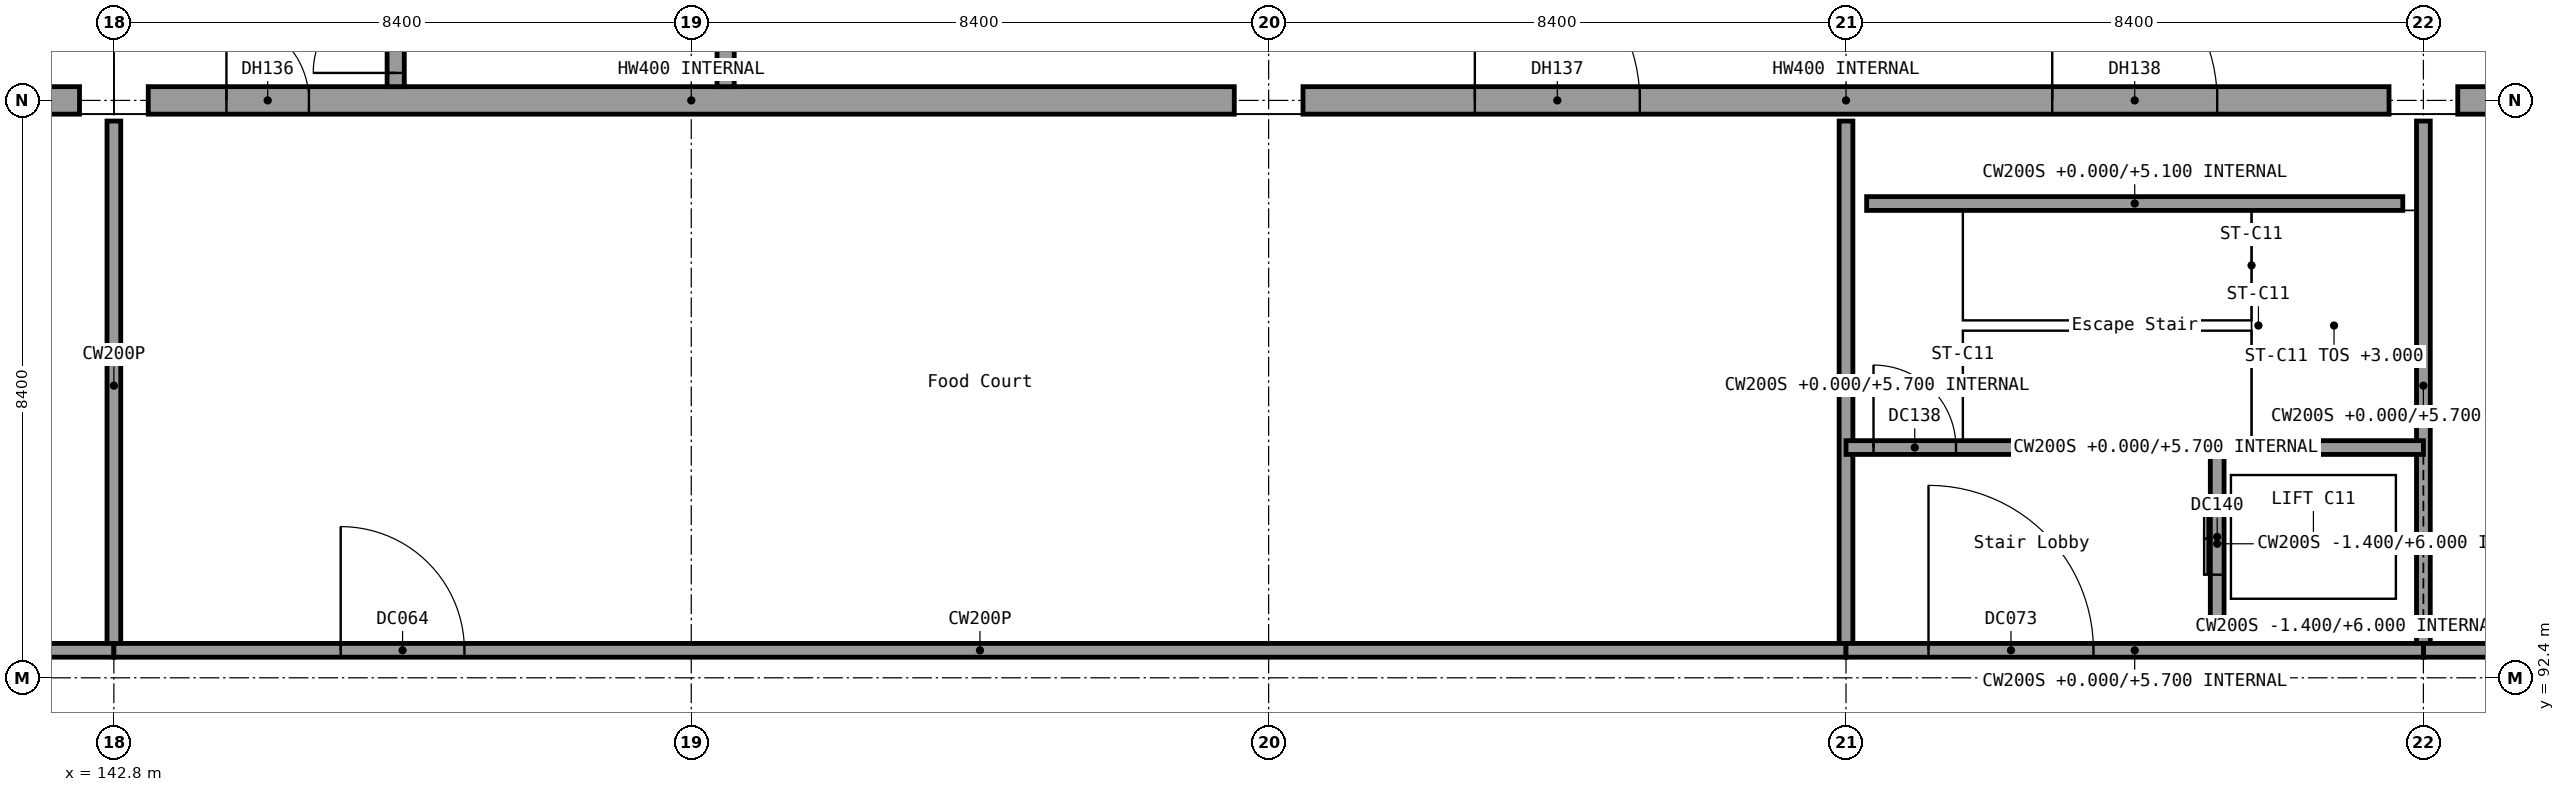
"""IFC4 building model, lengths in metres.
Left out: names, types, materials, properties, quantities, classifications, styles, units other than length and angle.
Written with IfcOpenShell. Run it as: python <this file> out.ifc"""

import sys

from ifc_helpers import new_model, si_unit, direction, frame, frame_2d, origin, origin_2d, place, context, subcontext, project, spatial, rectangle, extrude, element, fill, save


model = new_model("IFC4")
c1 = context("Model", 3, precision=1e-05, world=origin(), true_north=direction((0.0, 1.0)))
c2 = subcontext(c1, "Body", "Model", "MODEL_VIEW")
j1 = project(units=[si_unit("LENGTHUNIT", "METRE"), si_unit("PLANEANGLEUNIT", "RADIAN")], contexts=[c1])
p1 = place(None, origin())
s1 = spatial("IfcSite", under=j1, at=p1, CompositionType="ELEMENT")
p2 = place(p1, origin())
s2 = spatial("IfcBuilding", under=s1, at=p2, CompositionType="ELEMENT")
p3 = place(p2, origin())
s3 = spatial("IfcBuildingStorey", under=s2, at=p3, CompositionType="ELEMENT", Elevation=0.0)
for number, where, z_axis, x_axis in (
    (1, (142.8, 100.8, 0.0), (0.0, 0.0, 1.0), (1.0, 0.0, 0.0)),
    (2, (159.6, 100.8, 0.0), (0.0, 0.0, 1.0), (1.0, 0.0, 0.0)),
    (3, (176.4, 100.8, 0.0), (0.0, 0.0, 1.0), (1.0, 0.0, 0.0)),
):
    element("IfcColumn", number, at=place(p3, frame(where, z_axis=z_axis, x_axis=x_axis)), inside=s3, PredefinedType="COLUMN", context=c2, shape_type="SweptSolid", body=[
        extrude(rectangle(XDim=1.0, YDim=1.6, at=origin_2d()), origin(), (0.0, 0.0, 1.0), 6.0),
    ])
p4 = place(p3, frame((143.3, 100.8, 0.0), z_axis=(0.0, 0.0, 1.0), x_axis=(1.0, 0.0, 0.0)))
e4 = element("IfcWall", 4, at=p4, inside=s3, PredefinedType="STANDARD", context=c2, shape_type="SweptSolid", body=[
    extrude(rectangle(XDim=15.8, YDim=0.4, at=frame_2d((7.9, 0.0))), origin(), (0.0, 0.0, 1.0), 4.5),
])
p5 = place(p4, frame((1.137, 0.0, 0.0)))
e5 = element("IfcOpeningElement", 5, at=p5, cuts=e4, PredefinedType="OPENING", context=c2, shape_type="SweptSolid", body=[
    extrude(rectangle(XDim=1.2, YDim=2.1, at=frame_2d((0.6, 1.05))), frame((0.0, 0.2, 0.0), z_axis=(0.0, -1.0, 0.0), x_axis=(1.0, 0.0, 0.0)), (0.0, 0.0, 1.0), 0.4),
])
p6 = place(p3, frame((160.1, 100.8, 0.0), z_axis=(0.0, 0.0, 1.0), x_axis=(1.0, 0.0, 0.0)))
e6 = element("IfcWall", 6, at=p6, inside=s3, PredefinedType="STANDARD", context=c2, shape_type="SweptSolid", body=[
    extrude(rectangle(XDim=15.8, YDim=0.4, at=frame_2d((7.9, 0.0))), origin(), (0.0, 0.0, 1.0), 4.5),
])
p7 = place(p6, frame((2.5, 0.0, 0.0)))
e7 = element("IfcOpeningElement", 7, at=p7, cuts=e6, PredefinedType="OPENING", context=c2, shape_type="SweptSolid", body=[
    extrude(rectangle(XDim=2.4, YDim=2.4, at=frame_2d((1.2, 1.2))), frame((0.0, 0.2, 0.0), z_axis=(0.0, -1.0, 0.0), x_axis=(1.0, 0.0, 0.0)), (0.0, 0.0, 1.0), 0.4),
])
p8 = place(p6, frame((10.9, 0.0, 0.0)))
e8 = element("IfcOpeningElement", 8, at=p8, cuts=e6, PredefinedType="OPENING", context=c2, shape_type="SweptSolid", body=[
    extrude(rectangle(XDim=2.4, YDim=2.4, at=frame_2d((1.2, 1.2))), frame((0.0, 0.2, 0.0), z_axis=(0.0, -1.0, 0.0), x_axis=(1.0, 0.0, 0.0)), (0.0, 0.0, 1.0), 0.4),
])
p9 = place(p3, frame((176.9, 100.8, 0.0), z_axis=(0.0, 0.0, 1.0), x_axis=(1.0, 0.0, 0.0)))
e9 = element("IfcWall", 9, at=p9, inside=s3, PredefinedType="STANDARD", context=c2, shape_type="SweptSolid", body=[
    extrude(rectangle(XDim=15.8, YDim=0.4, at=frame_2d((7.9, 0.0))), origin(), (0.0, 0.0, 1.0), 4.5),
])
p10 = place(p9, frame((2.5, 0.0, 0.0)))
e10 = element("IfcOpeningElement", 10, at=p10, cuts=e9, PredefinedType="OPENING", context=c2, shape_type="SweptSolid", body=[
    extrude(rectangle(XDim=2.4, YDim=2.4, at=frame_2d((1.2, 1.2))), frame((0.0, 0.2, 0.0), z_axis=(0.0, -1.0, 0.0), x_axis=(1.0, 0.0, 0.0)), (0.0, 0.0, 1.0), 0.4),
])
p11 = place(p9, frame((10.9, 0.0, 0.0)))
e11 = element("IfcOpeningElement", 11, at=p11, cuts=e9, PredefinedType="OPENING", context=c2, shape_type="SweptSolid", body=[
    extrude(rectangle(XDim=2.4, YDim=2.4, at=frame_2d((1.2, 1.2))), frame((0.0, 0.2, 0.0), z_axis=(0.0, -1.0, 0.0), x_axis=(1.0, 0.0, 0.0)), (0.0, 0.0, 1.0), 0.4),
])
p12 = place(p3, frame((126.5, 100.8, 0.0), z_axis=(0.0, 0.0, 1.0), x_axis=(1.0, 0.0, 0.0)))
e12 = element("IfcWall", 12, at=p12, inside=s3, PredefinedType="SHEAR", context=c2, shape_type="SweptSolid", body=[
    extrude(rectangle(XDim=15.8, YDim=0.4, at=frame_2d((7.9, 0.0))), origin(), (0.0, 0.0, 1.0), 5.7),
])
p13 = place(p12, frame((2.5, 0.0, 0.0)))
e13 = element("IfcOpeningElement", 13, at=p13, cuts=e12, PredefinedType="OPENING", context=c2, shape_type="SweptSolid", body=[
    extrude(rectangle(XDim=2.4, YDim=2.4, at=frame_2d((1.2, 1.2))), frame((0.0, 0.2, 0.0), z_axis=(0.0, -1.0, 0.0), x_axis=(1.0, 0.0, 0.0)), (0.0, 0.0, 1.0), 0.4),
])
p14 = place(p12, frame((10.9, 0.0, 0.0)))
e14 = element("IfcOpeningElement", 14, at=p14, cuts=e12, PredefinedType="OPENING", context=c2, shape_type="SweptSolid", body=[
    extrude(rectangle(XDim=2.4, YDim=2.4, at=frame_2d((1.2, 1.2))), frame((0.0, 0.2, 0.0), z_axis=(0.0, -1.0, 0.0), x_axis=(1.0, 0.0, 0.0)), (0.0, 0.0, 1.0), 0.4),
])
p15 = place(p3, frame((146.9, 101.0, 0.0), z_axis=(0.0, 0.0, 1.0), x_axis=(0.0, 1.0, 0.0)))
e15 = element("IfcWall", 15, at=p15, inside=s3, PredefinedType="SHEAR", context=c2, shape_type="SweptSolid", body=[
    extrude(rectangle(XDim=8.2, YDim=0.25, at=frame_2d((4.1, 0.0))), origin(), (0.0, 0.0, 1.0), 5.7),
])
p16 = place(p15, frame((0.2, 0.0, 0.0)))
e16 = element("IfcOpeningElement", 16, at=p16, cuts=e15, PredefinedType="OPENING", context=c2, shape_type="SweptSolid", body=[
    extrude(rectangle(XDim=1.2, YDim=2.1, at=frame_2d((0.6, 1.05))), frame((0.0, 0.125, 0.0), z_axis=(0.0, -1.0, 0.0), x_axis=(1.0, 0.0, 0.0)), (0.0, 0.0, 1.0), 0.25),
])
p17 = place(p3, frame((151.7, 101.0, 0.0), z_axis=(0.0, 0.0, 1.0), x_axis=(0.0, 1.0, 0.0)))
e17 = element("IfcWall", 17, at=p17, inside=s3, PredefinedType="SHEAR", context=c2, shape_type="SweptSolid", body=[
    extrude(rectangle(XDim=8.2, YDim=0.25, at=frame_2d((4.1, 0.0))), origin(), (0.0, 0.0, 1.0), 5.7),
])
p18 = place(p17, frame((2.0, 0.0, 0.0)))
e18 = element("IfcOpeningElement", 18, at=p18, cuts=e17, PredefinedType="OPENING", context=c2, shape_type="SweptSolid", body=[
    extrude(rectangle(XDim=1.2, YDim=2.1, at=frame_2d((0.6, 1.05))), frame((0.0, 0.125, 0.0), z_axis=(0.0, -1.0, 0.0), x_axis=(1.0, 0.0, 0.0)), (0.0, 0.0, 1.0), 0.25),
])
for number, where, z_axis, x_axis in (
    (19, (142.8, 92.4, 0.0), (0.0, 0.0, 1.0), (1.0, 0.0, 0.0)),
    (20, (151.2, 92.4, 0.0), (0.0, 0.0, 1.0), (1.0, 0.0, 0.0)),
    (21, (159.6, 92.4, 0.0), (0.0, 0.0, 1.0), (1.0, 0.0, 0.0)),
    (22, (168.0, 92.4, 0.0), (0.0, 0.0, 1.0), (1.0, 0.0, 0.0)),
    (23, (176.4, 92.4, 0.0), (0.0, 0.0, 1.0), (1.0, 0.0, 0.0)),
    (24, (142.8, 99.6, 0.0), (0.0, 0.0, 1.0), (1.0, 0.0, 0.0)),
    (25, (151.2, 99.6, 0.0), (0.0, 0.0, 1.0), (1.0, 0.0, 0.0)),
    (26, (159.6, 99.6, 0.0), (0.0, 0.0, 1.0), (1.0, 0.0, 0.0)),
    (27, (168.0, 99.6, 0.0), (0.0, 0.0, 1.0), (1.0, 0.0, 0.0)),
    (28, (176.4, 99.6, 0.0), (0.0, 0.0, 1.0), (1.0, 0.0, 0.0)),
):
    element("IfcColumn", number, at=place(p3, frame(where, z_axis=z_axis, x_axis=x_axis)), inside=s3, PredefinedType="COLUMN", context=c2, shape_type="SweptSolid", body=[
        extrude(rectangle(XDim=0.6, YDim=0.6, at=origin_2d()), origin(), (0.0, 0.0, 1.0), 6.0),
    ])
for number, where, z_axis, x_axis in (
    (29, (168.0, 100.5, 0.0), (0.0, 0.0, 1.0), (0.0, -1.0, 0.0)),
    (30, (176.4, 100.5, 0.0), (0.0, 0.0, 1.0), (0.0, -1.0, 0.0)),
):
    element("IfcWall", number, at=place(p3, frame(where, z_axis=z_axis, x_axis=x_axis)), inside=s3, PredefinedType="SOLIDWALL", context=c2, shape_type="SweptSolid", body=[
        extrude(rectangle(XDim=7.7, YDim=0.2, at=frame_2d((3.85, 0.0))), origin(), (0.0, 0.0, 1.0), 5.7),
    ])
p19 = place(p3, frame((168.3, 99.3, 0.0), z_axis=(0.0, 0.0, 1.0), x_axis=(1.0, 0.0, 0.0)))
e31 = element("IfcWall", 31, at=p19, inside=s3, PredefinedType="SOLIDWALL", context=c2, shape_type="SweptSolid", body=[
    extrude(rectangle(XDim=7.8, YDim=0.2, at=frame_2d((3.9, 0.0))), origin(), (0.0, 0.0, 1.0), 5.1),
])
p20 = place(p3, frame((142.8, 100.5, 0.0), z_axis=(0.0, 0.0, 1.0), x_axis=(0.0, -1.0, 0.0)))
e32 = element("IfcWall", 32, at=p20, inside=s3, PredefinedType="PARTITIONING", context=c2, shape_type="SweptSolid", body=[
    extrude(rectangle(XDim=7.7, YDim=0.2, at=frame_2d((3.85, 0.0))), origin(), (0.0, 0.0, 1.0), 5.7),
])
p21 = place(p3, frame((126.0, 92.8, 0.0), z_axis=(0.0, 0.0, 1.0), x_axis=(1.0, 0.0, 0.0)))
e33 = element("IfcWall", 33, at=p21, inside=s3, PredefinedType="PARTITIONING", context=c2, shape_type="SweptSolid", body=[
    extrude(rectangle(XDim=16.8, YDim=0.2, at=frame_2d((8.4, 0.0))), origin(), (0.0, 0.0, 1.0), 5.7),
])
p22 = place(p21, frame((3.3, 0.0, 0.0)))
e34 = element("IfcOpeningElement", 34, at=p22, cuts=e33, PredefinedType="OPENING", context=c2, shape_type="SweptSolid", body=[
    extrude(rectangle(XDim=1.8, YDim=2.4, at=frame_2d((0.9, 1.2))), frame((0.0, 0.1, 0.0), z_axis=(0.0, -1.0, 0.0), x_axis=(1.0, 0.0, 0.0)), (0.0, 0.0, 1.0), 0.2),
])
p23 = place(p3, frame((142.8, 92.8, 0.0), z_axis=(0.0, 0.0, 1.0), x_axis=(1.0, 0.0, 0.0)))
e35 = element("IfcWall", 35, at=p23, inside=s3, PredefinedType="PARTITIONING", context=c2, shape_type="SweptSolid", body=[
    extrude(rectangle(XDim=25.2, YDim=0.2, at=frame_2d((12.6, 0.0))), origin(), (0.0, 0.0, 1.0), 5.7),
])
p24 = place(p23, frame((3.3, 0.0, 0.0)))
e36 = element("IfcOpeningElement", 36, at=p24, cuts=e35, PredefinedType="OPENING", context=c2, shape_type="SweptSolid", body=[
    extrude(rectangle(XDim=1.8, YDim=2.4, at=frame_2d((0.9, 1.2))), frame((0.0, 0.1, 0.0), z_axis=(0.0, -1.0, 0.0), x_axis=(1.0, 0.0, 0.0)), (0.0, 0.0, 1.0), 0.2),
])
p25 = place(p3, frame((176.4, 92.8, 0.0), z_axis=(0.0, 0.0, 1.0), x_axis=(1.0, 0.0, 0.0)))
e37 = element("IfcWall", 37, at=p25, inside=s3, PredefinedType="PARTITIONING", context=c2, shape_type="SweptSolid", body=[
    extrude(rectangle(XDim=25.2, YDim=0.2, at=frame_2d((12.6, 0.0))), origin(), (0.0, 0.0, 1.0), 5.7),
])
p26 = place(p25, frame((3.3, 0.0, 0.0)))
e38 = element("IfcOpeningElement", 38, at=p26, cuts=e37, PredefinedType="OPENING", context=c2, shape_type="SweptSolid", body=[
    extrude(rectangle(XDim=1.8, YDim=2.4, at=frame_2d((0.9, 1.2))), frame((0.0, 0.1, 0.0), z_axis=(0.0, -1.0, 0.0), x_axis=(1.0, 0.0, 0.0)), (0.0, 0.0, 1.0), 0.2),
])
p27 = place(p3, frame((168.0, 92.8, 0.0), z_axis=(0.0, 0.0, 1.0), x_axis=(1.0, 0.0, 0.0)))
e39 = element("IfcWall", 39, at=p27, inside=s3, PredefinedType="SOLIDWALL", context=c2, shape_type="SweptSolid", body=[
    extrude(rectangle(XDim=8.4, YDim=0.2, at=frame_2d((4.2, 0.0))), origin(), (0.0, 0.0, 1.0), 5.7),
])
p28 = place(p27, frame((1.2, 0.0, 0.0)))
e40 = element("IfcOpeningElement", 40, at=p28, cuts=e39, PredefinedType="OPENING", context=c2, shape_type="SweptSolid", body=[
    extrude(rectangle(XDim=2.4, YDim=2.4, at=frame_2d((1.2, 1.2))), frame((0.0, 0.1, 0.0), z_axis=(0.0, -1.0, 0.0), x_axis=(1.0, 0.0, 0.0)), (0.0, 0.0, 1.0), 0.2),
])
p29 = place(p3, frame((168.0, 95.75, 0.0), z_axis=(0.0, 0.0, 1.0), x_axis=(1.0, 0.0, 0.0)))
e41 = element("IfcWall", 41, at=p29, inside=s3, PredefinedType="SOLIDWALL", context=c2, shape_type="SweptSolid", body=[
    extrude(rectangle(XDim=8.4, YDim=0.2, at=frame_2d((4.2, 0.0))), origin(), (0.0, 0.0, 1.0), 5.7),
])
p30 = place(p29, frame((0.4, 0.0, 0.0)))
e42 = element("IfcOpeningElement", 42, at=p30, cuts=e41, PredefinedType="OPENING", context=c2, shape_type="SweptSolid", body=[
    extrude(rectangle(XDim=1.2, YDim=2.4, at=frame_2d((0.6, 1.2))), frame((0.0, 0.1, 0.0), z_axis=(0.0, -1.0, 0.0), x_axis=(1.0, 0.0, 0.0)), (0.0, 0.0, 1.0), 0.2),
])
p31 = place(p3, frame((173.4, 93.05, -1.4), z_axis=(0.0, 0.0, 1.0), x_axis=(0.0, 1.0, 0.0)))
e43 = element("IfcWall", 43, at=p31, inside=s3, PredefinedType="SOLIDWALL", context=c2, shape_type="SweptSolid", body=[
    extrude(rectangle(XDim=2.6, YDim=0.2, at=frame_2d((1.3, 0.0))), origin(), (0.0, 0.0, 1.0), 7.4),
])
p32 = place(p31, frame((0.85, 0.0, 1.4)))
e44 = element("IfcOpeningElement", 44, at=p32, cuts=e43, PredefinedType="OPENING", context=c2, shape_type="SweptSolid", body=[
    extrude(rectangle(XDim=1.1, YDim=2.1, at=frame_2d((0.55, 1.05))), frame((0.0, 0.1, 0.0), z_axis=(0.0, -1.0, 0.0), x_axis=(1.0, 0.0, 0.0)), (0.0, 0.0, 1.0), 0.2),
])
p33 = place(p3, frame((173.3, 93.15, -1.4), z_axis=(0.0, 0.0, 1.0), x_axis=(1.0, 0.0, 0.0)))
e45 = element("IfcWall", 45, at=p33, inside=s3, PredefinedType="SOLIDWALL", context=c2, shape_type="SweptSolid", body=[
    extrude(rectangle(XDim=3.1, YDim=0.2, at=frame_2d((1.55, 0.0))), origin(), (0.0, 0.0, 1.0), 7.4),
])
p34 = place(p5, origin())
e46 = element("IfcDoor", 46, at=p34, inside=s3, OperationType="SINGLE_SWING_LEFT", PredefinedType="DOOR", context=c2, shape_type="SweptSolid", body=[
    extrude(rectangle(XDim=1.2, YDim=2.1, at=frame_2d((0.6, 1.05))), frame((0.0, 0.025, 0.0), z_axis=(0.0, -1.0, 0.0), x_axis=(1.0, 0.0, 0.0)), (0.0, 0.0, 1.0), 0.05),
])
fill(e5, e46)
p35 = place(p7, origin())
e47 = element("IfcDoor", 47, at=p35, inside=s3, OperationType="DOUBLE_DOOR_SINGLE_SWING", PredefinedType="DOOR", context=c2, shape_type="SweptSolid", body=[
    extrude(rectangle(XDim=2.4, YDim=2.4, at=frame_2d((1.2, 1.2))), frame((0.0, 0.025, 0.0), z_axis=(0.0, -1.0, 0.0), x_axis=(1.0, 0.0, 0.0)), (0.0, 0.0, 1.0), 0.05),
])
fill(e7, e47)
p36 = place(p8, origin())
e48 = element("IfcDoor", 48, at=p36, inside=s3, OperationType="DOUBLE_DOOR_SINGLE_SWING", PredefinedType="DOOR", context=c2, shape_type="SweptSolid", body=[
    extrude(rectangle(XDim=2.4, YDim=2.4, at=frame_2d((1.2, 1.2))), frame((0.0, 0.025, 0.0), z_axis=(0.0, -1.0, 0.0), x_axis=(1.0, 0.0, 0.0)), (0.0, 0.0, 1.0), 0.05),
])
fill(e8, e48)
p37 = place(p16, origin())
e49 = element("IfcDoor", 49, at=p37, inside=s3, OperationType="SINGLE_SWING_LEFT", PredefinedType="DOOR", context=c2, shape_type="SweptSolid", body=[
    extrude(rectangle(XDim=1.2, YDim=2.1, at=frame_2d((0.6, 1.05))), frame((0.0, 0.025, 0.0), z_axis=(0.0, -1.0, 0.0), x_axis=(1.0, 0.0, 0.0)), (0.0, 0.0, 1.0), 0.05),
])
fill(e16, e49)
p38 = place(p24, origin())
e50 = element("IfcDoor", 50, at=p38, inside=s3, OperationType="DOUBLE_DOOR_DOUBLE_SWING", PredefinedType="DOOR", context=c2, shape_type="SweptSolid", body=[
    extrude(rectangle(XDim=1.8, YDim=2.4, at=frame_2d((0.9, 1.2))), frame((0.0, 0.025, 0.0), z_axis=(0.0, -1.0, 0.0), x_axis=(1.0, 0.0, 0.0)), (0.0, 0.0, 1.0), 0.05),
])
fill(e36, e50)
p39 = place(p28, origin())
e51 = element("IfcDoor", 51, at=p39, inside=s3, OperationType="DOUBLE_DOOR_DOUBLE_SWING", PredefinedType="DOOR", context=c2, shape_type="SweptSolid", body=[
    extrude(rectangle(XDim=2.4, YDim=2.4, at=frame_2d((1.2, 1.2))), frame((0.0, 0.025, 0.0), z_axis=(0.0, -1.0, 0.0), x_axis=(1.0, 0.0, 0.0)), (0.0, 0.0, 1.0), 0.05),
])
fill(e40, e51)
p40 = place(p30, origin())
e52 = element("IfcDoor", 52, at=p40, inside=s3, OperationType="SINGLE_SWING_LEFT", PredefinedType="DOOR", context=c2, shape_type="SweptSolid", body=[
    extrude(rectangle(XDim=1.2, YDim=2.4, at=frame_2d((0.6, 1.2))), frame((0.0, 0.025, 0.0), z_axis=(0.0, -1.0, 0.0), x_axis=(1.0, 0.0, 0.0)), (0.0, 0.0, 1.0), 0.05),
])
fill(e42, e52)
p41 = place(p32, origin())
e53 = element("IfcDoor", 53, at=p41, inside=s3, OperationType="DOUBLE_DOOR_SLIDING", PredefinedType="DOOR", context=c2, shape_type="SweptSolid", body=[
    extrude(rectangle(XDim=1.1, YDim=2.1, at=frame_2d((0.55, 1.05))), frame((0.0, 0.025, 0.0), z_axis=(0.0, -1.0, 0.0), x_axis=(1.0, 0.0, 0.0)), (0.0, 0.0, 1.0), 0.05),
])
fill(e44, e53)
save(model, sys.argv[1])
